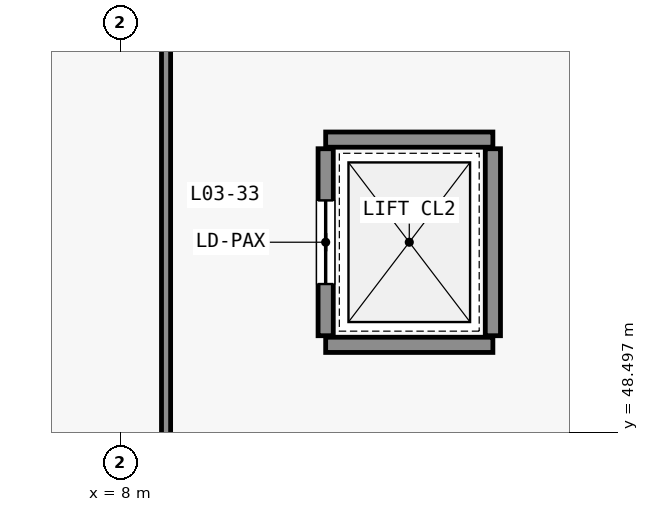
"""IFC4 building model, lengths in metres.
Left out: names, types, materials, properties, quantities, classifications, styles, units other than length and angle.
Written with IfcOpenShell. Run it as: python <this file> out.ifc"""

import sys

from ifc_helpers import new_model, si_unit, direction, frame, frame_2d, origin, place, context, subcontext, project, spatial, rectangle, extrude, element, fill, save


model = new_model("IFC4")
c1 = context("Model", 3, precision=1e-05, world=origin(), true_north=direction((0.0, 1.0)))
c2 = subcontext(c1, "Body", "Model", "MODEL_VIEW")
j1 = project(units=[si_unit("LENGTHUNIT", "METRE"), si_unit("PLANEANGLEUNIT", "RADIAN")], contexts=[c1])
p1 = place(None, origin())
s1 = spatial("IfcSite", under=j1, at=p1, CompositionType="ELEMENT")
p2 = place(p1, origin())
s2 = spatial("IfcBuilding", under=s1, at=p2, CompositionType="ELEMENT")
p3 = place(p2, frame((0.0, 0.0, 16.2)))
s3 = spatial("IfcBuildingStorey", under=s2, at=p3, CompositionType="ELEMENT", Elevation=16.2)
for number, where, z_axis, x_axis in (
    (1, (10.7, 49.65, 0.0), (0.0, 0.0, 1.0), (1.0, 0.0, 0.0)),
    (2, (10.7, 52.35, 0.0), (0.0, 0.0, 1.0), (1.0, 0.0, 0.0)),
):
    element("IfcWall", number, at=place(p3, frame(where, z_axis=z_axis, x_axis=x_axis)), inside=s3, PredefinedType="STANDARD", context=c2, shape_type="SweptSolid", body=[
        extrude(rectangle(XDim=2.2, YDim=0.2, at=frame_2d((1.1, 0.0))), origin(), (0.0, 0.0, 1.0), 4.44),
    ])
p4 = place(p3, frame((10.7, 49.77, 0.0), z_axis=(0.0, 0.0, 1.0), x_axis=(0.0, 1.0, 0.0)))
e3 = element("IfcWall", 3, at=p4, inside=s3, PredefinedType="STANDARD", context=c2, shape_type="SweptSolid", body=[
    extrude(rectangle(XDim=2.46, YDim=0.2, at=frame_2d((1.23, 0.0))), origin(), (0.0, 0.0, 1.0), 4.44),
])
p5 = place(p4, frame((0.68, 0.0, 0.0)))
e4 = element("IfcOpeningElement", 4, at=p5, cuts=e3, PredefinedType="OPENING", context=c2, shape_type="SweptSolid", body=[
    extrude(rectangle(XDim=1.1, YDim=2.15, at=frame_2d((0.55, 1.075))), frame((0.0, 0.11, 0.0), z_axis=(0.0, -1.0, 0.0), x_axis=(1.0, 0.0, 0.0)), (0.0, 0.0, 1.0), 0.22),
])
p6 = place(p3, frame((12.9, 49.77, 0.0), z_axis=(0.0, 0.0, 1.0), x_axis=(0.0, 1.0, 0.0)))
e5 = element("IfcWall", 5, at=p6, inside=s3, PredefinedType="STANDARD", context=c2, shape_type="SweptSolid", body=[
    extrude(rectangle(XDim=2.46, YDim=0.2, at=frame_2d((1.23, 0.0))), origin(), (0.0, 0.0, 1.0), 4.44),
])
p7 = place(p3, frame((8.6, 33.62, 0.0), z_axis=(0.0, 0.0, 1.0), x_axis=(0.0, 1.0, 0.0)))
e6 = element("IfcWall", 6, at=p7, inside=s3, PredefinedType="PARTITIONING", context=c2, shape_type="SweptSolid", body=[
    extrude(rectangle(XDim=22.26, YDim=0.12, at=frame_2d((11.13, 0.0))), origin(), (0.0, 0.0, 1.0), 3.69),
])
p8 = place(p7, frame((9.13, 0.0, 0.0)))
e7 = element("IfcOpeningElement", 7, at=p8, cuts=e6, PredefinedType="OPENING", context=c2, shape_type="SweptSolid", body=[
    extrude(rectangle(XDim=1.6, YDim=2.25, at=frame_2d((0.8, 1.125))), frame((0.0, 0.07, 0.0), z_axis=(0.0, -1.0, 0.0), x_axis=(1.0, 0.0, 0.0)), (0.0, 0.0, 1.0), 0.14),
])
p9 = place(p5, origin())
e8 = element("IfcDoor", 8, at=p9, inside=s3, OperationType="SLIDING_TO_LEFT", PredefinedType="DOOR", context=c2, shape_type="SweptSolid", body=[
    extrude(rectangle(XDim=1.1, YDim=2.15, at=frame_2d((0.55, 1.075))), frame((0.0, 0.025, 0.0), z_axis=(0.0, -1.0, 0.0), x_axis=(1.0, 0.0, 0.0)), (0.0, 0.0, 1.0), 0.05),
])
fill(e4, e8)
save(model, sys.argv[1])
